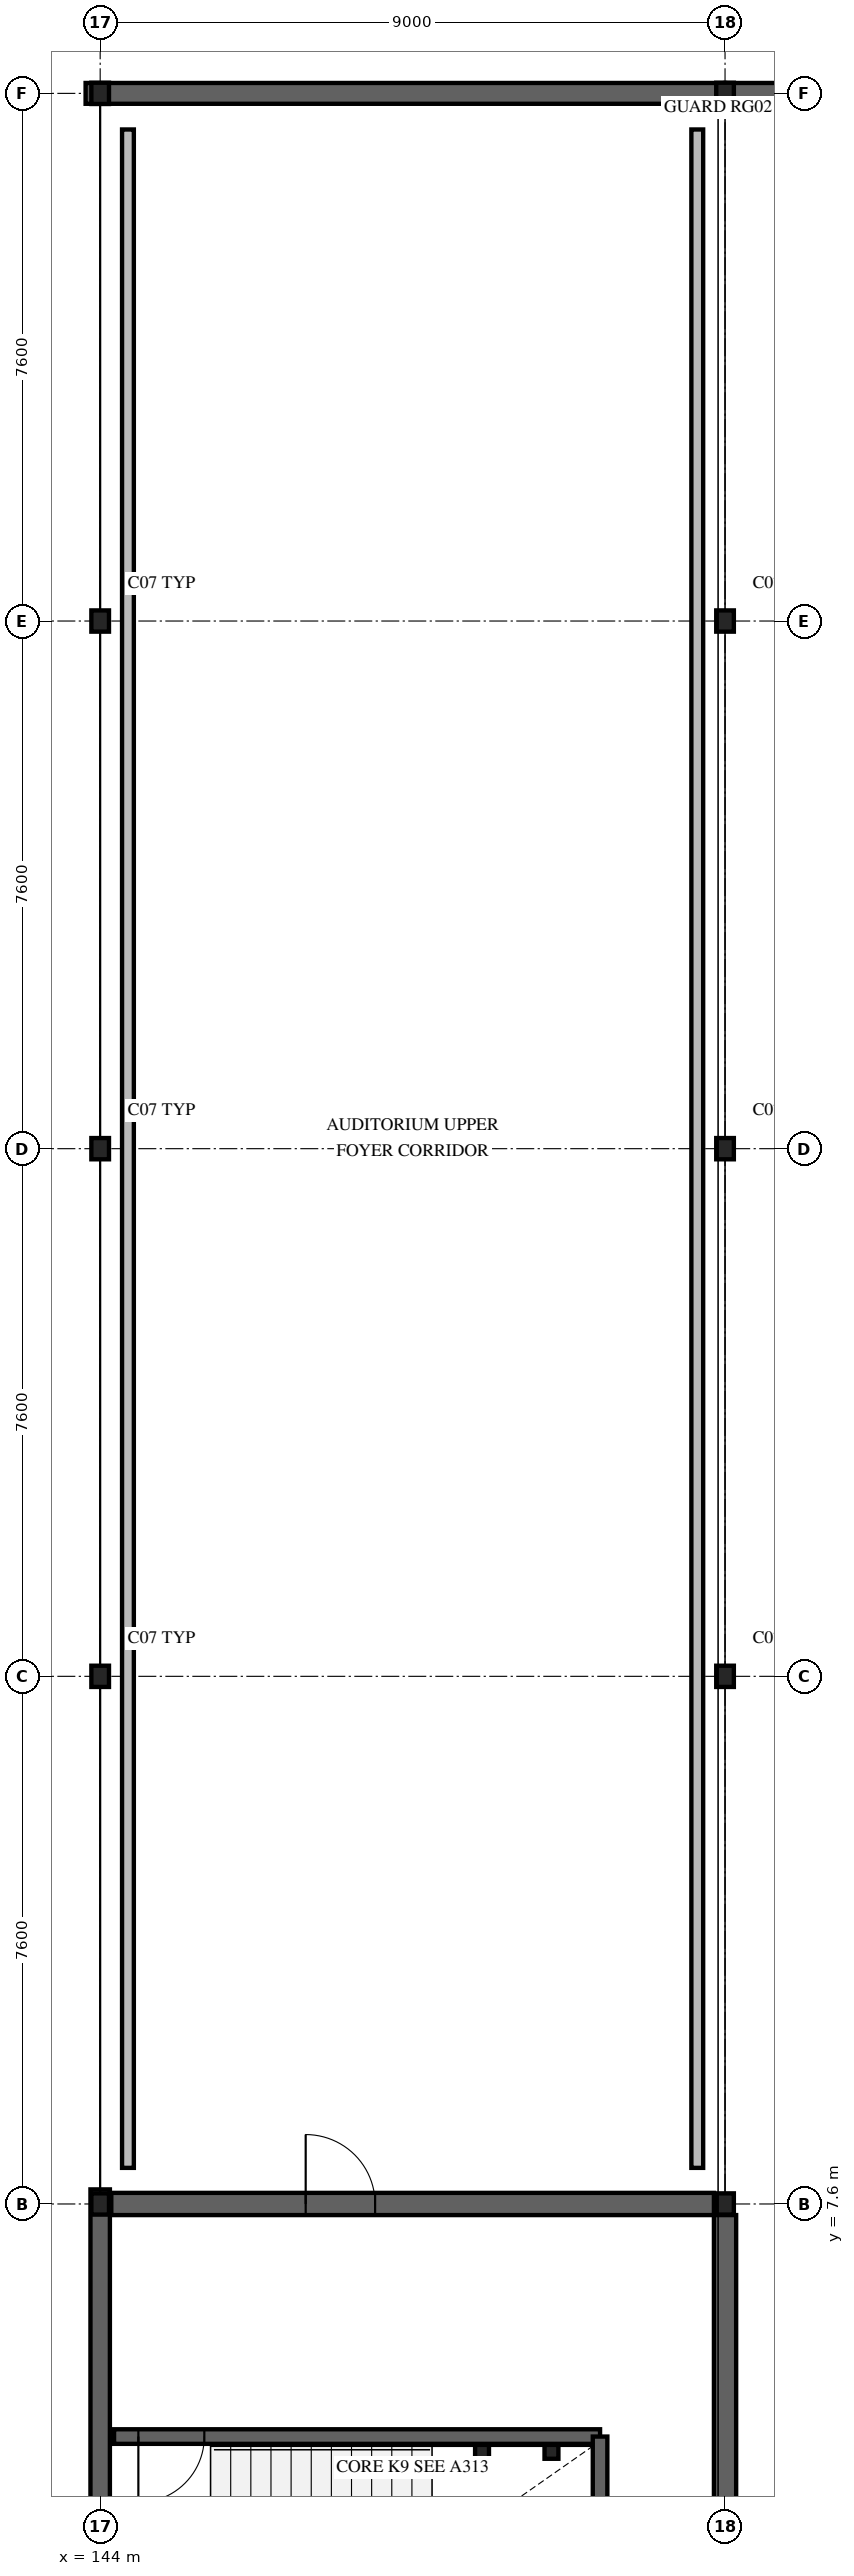
"""IFC4 building model, lengths in metres.
Left out: names, types, materials, properties, quantities, classifications, styles, units other than length and angle.
Written with IfcOpenShell. Run it as: python <this file> out.ifc"""

import sys

from ifc_helpers import new_model, si_unit, direction, frame, frame_2d, origin, origin_2d, place, context, subcontext, project, spatial, rectangle, hollow_rectangle, i_section, extrude, element, fill, save


model = new_model("IFC4")
c1 = context("Model", 3, precision=1e-05, world=origin(), true_north=direction((0.0, 1.0)))
c2 = subcontext(c1, "Body", "Model", "MODEL_VIEW")
j1 = project(units=[si_unit("LENGTHUNIT", "METRE"), si_unit("PLANEANGLEUNIT", "RADIAN")], contexts=[c1])
p1 = place(None, origin())
s1 = spatial("IfcSite", under=j1, at=p1, CompositionType="ELEMENT")
p2 = place(p1, origin())
s2 = spatial("IfcBuilding", under=s1, at=p2, CompositionType="ELEMENT")
p3 = place(p2, frame((0.0, 0.0, 5.04)))
s3 = spatial("IfcBuildingStorey", under=s2, at=p3, CompositionType="ELEMENT", Elevation=5.04)
for number, where, z_axis, x_axis in (
    (1, (144.0, 7.6, 0.0), (0.0, 0.0, 1.0), (1.0, 0.0, 0.0)),
    (2, (144.0, 15.2, 0.0), (0.0, 0.0, 1.0), (1.0, 0.0, 0.0)),
    (3, (144.0, 22.8, 0.0), (0.0, 0.0, 1.0), (1.0, 0.0, 0.0)),
    (4, (144.0, 30.4, 0.0), (0.0, 0.0, 1.0), (1.0, 0.0, 0.0)),
    (5, (144.0, 38.0, 0.0), (0.0, 0.0, 1.0), (1.0, 0.0, 0.0)),
    (6, (153.0, 7.6, 0.0), (0.0, 0.0, 1.0), (1.0, 0.0, 0.0)),
    (7, (153.0, 15.2, 0.0), (0.0, 0.0, 1.0), (1.0, 0.0, 0.0)),
    (8, (153.0, 22.8, 0.0), (0.0, 0.0, 1.0), (1.0, 0.0, 0.0)),
    (9, (153.0, 30.4, 0.0), (0.0, 0.0, 1.0), (1.0, 0.0, 0.0)),
    (10, (153.0, 38.0, 0.0), (0.0, 0.0, 1.0), (1.0, 0.0, 0.0)),
):
    element("IfcColumn", number, at=place(p3, frame(where, z_axis=z_axis, x_axis=x_axis)), inside=s3, PredefinedType="COLUMN", context=c2, shape_type="SweptSolid", body=[
        extrude(i_section(OverallWidth=0.254, OverallDepth=0.306, WebThickness=0.009, FlangeThickness=0.015, FilletRadius=0.015, at=origin_2d()), origin(), (0.0, 0.0, 1.0), 4.32),
    ])
p4 = place(p3, frame((144.0, 0.0, 0.0), z_axis=(0.0, 0.0, 1.0), x_axis=(0.0, 1.0, 0.0)))
e11 = element("IfcWall", 11, at=p4, inside=s3, PredefinedType="SOLIDWALL", context=c2, shape_type="SweptSolid", body=[
    extrude(rectangle(XDim=7.81, YDim=0.28, at=frame_2d((3.905, 0.0))), origin(), (0.0, 0.0, 1.0), 4.32),
])
p5 = place(p3, frame((143.79, 38.0, 0.0), z_axis=(0.0, 0.0, 1.0), x_axis=(1.0, 0.0, 0.0)))
e12 = element("IfcWall", 12, at=p5, inside=s3, PredefinedType="SOLIDWALL", context=c2, shape_type="SweptSolid", body=[
    extrude(rectangle(XDim=9.21, YDim=0.3, at=frame_2d((4.605, 0.0))), origin(), (0.0, 0.0, 1.0), 4.32),
])
p6 = place(p3, frame((153.0, 38.0, 0.0), z_axis=(0.0, 0.0, 1.0), x_axis=(1.0, 0.0, 0.0)))
e13 = element("IfcWall", 13, at=p6, inside=s3, PredefinedType="SOLIDWALL", context=c2, shape_type="SweptSolid", body=[
    extrude(rectangle(XDim=9.0, YDim=0.3, at=frame_2d((4.5, 0.0))), origin(), (0.0, 0.0, 1.0), 4.32),
])
p7 = place(p3, frame((144.16, 7.6, 0.0), z_axis=(0.0, 0.0, 1.0), x_axis=(1.0, 0.0, 0.0)))
e14 = element("IfcWall", 14, at=p7, inside=s3, PredefinedType="SHEAR", context=c2, shape_type="SweptSolid", body=[
    extrude(rectangle(XDim=8.68, YDim=0.32, at=frame_2d((4.34, 0.0))), origin(), (0.0, 0.0, 1.0), 4.04),
])
p8 = place(p7, frame((2.8, 0.0, 0.0)))
e15 = element("IfcOpeningElement", 15, at=p8, cuts=e14, PredefinedType="OPENING", context=c2, shape_type="SweptSolid", body=[
    extrude(rectangle(XDim=1.0, YDim=2.15, at=frame_2d((0.5, 1.075))), frame((0.0, 0.17, 0.0), z_axis=(0.0, -1.0, 0.0), x_axis=(1.0, 0.0, 0.0)), (0.0, 0.0, 1.0), 0.34),
])
p9 = place(p3, frame((153.0, 0.16, 0.0), z_axis=(0.0, 0.0, 1.0), x_axis=(0.0, 1.0, 0.0)))
e16 = element("IfcWall", 16, at=p9, inside=s3, PredefinedType="SHEAR", context=c2, shape_type="SweptSolid", body=[
    extrude(rectangle(XDim=7.28, YDim=0.32, at=frame_2d((3.64, 0.0))), origin(), (0.0, 0.0, 1.0), 4.04),
])
p10 = place(p3, frame((144.2, 4.25, 0.0), z_axis=(0.0, 0.0, 1.0), x_axis=(1.0, 0.0, 0.0)))
e17 = element("IfcWall", 17, at=p10, inside=s3, PredefinedType="SOLIDWALL", context=c2, shape_type="SweptSolid", body=[
    extrude(rectangle(XDim=7.0, YDim=0.21, at=frame_2d((3.5, 0.0))), origin(), (0.0, 0.0, 1.0), 4.04),
])
p11 = place(p10, frame((0.35, 0.0, 0.0)))
e18 = element("IfcOpeningElement", 18, at=p11, cuts=e17, PredefinedType="OPENING", context=c2, shape_type="SweptSolid", body=[
    extrude(rectangle(XDim=0.95, YDim=2.12, at=frame_2d((0.475, 1.06))), frame((0.0, 0.115, 0.0), z_axis=(0.0, -1.0, 0.0), x_axis=(1.0, 0.0, 0.0)), (0.0, 0.0, 1.0), 0.23),
])
p12 = place(p3, frame((151.2, 0.2, 0.0), z_axis=(0.0, 0.0, 1.0), x_axis=(0.0, 1.0, 0.0)))
e19 = element("IfcWall", 19, at=p12, inside=s3, PredefinedType="SOLIDWALL", context=c2, shape_type="SweptSolid", body=[
    extrude(rectangle(XDim=4.05, YDim=0.21, at=frame_2d((2.025, 0.0))), origin(), (0.0, 0.0, 1.0), 4.04),
])
for number, where, z_axis, x_axis in (
    (20, (149.5, 4.03, 0.0), (0.0, 0.0, 1.0), (1.0, 0.0, 0.0)),
    (21, (150.5, 4.03, 0.0), (0.0, 0.0, 1.0), (1.0, 0.0, 0.0)),
):
    element("IfcColumn", number, at=place(p3, frame(where, z_axis=z_axis, x_axis=x_axis)), inside=s3, PredefinedType="COLUMN", context=c2, shape_type="SweptSolid", body=[
        extrude(hollow_rectangle(XDim=0.2, YDim=0.2, WallThickness=0.012, at=origin_2d()), origin(), (0.0, 0.0, 1.0), 1.97),
    ])
for number, where, z_axis, x_axis in (
    (22, (144.4, 8.12, 0.0), (0.0, 0.0, 1.0), (0.0, 1.0, 0.0)),
    (23, (152.6, 8.12, 0.0), (0.0, 0.0, 1.0), (0.0, 1.0, 0.0)),
):
    element("IfcWall", number, at=place(p3, frame(where, z_axis=z_axis, x_axis=x_axis)), inside=s3, PredefinedType="PARTITIONING", context=c2, shape_type="SweptSolid", body=[
        extrude(rectangle(XDim=29.36, YDim=0.17, at=frame_2d((14.68, 0.0))), origin(), (0.0, 0.0, 1.0), 4.04),
    ])
p13 = place(p11, origin())
e24 = element("IfcDoor", 24, at=p13, inside=s3, OperationType="SINGLE_SWING_RIGHT", PredefinedType="DOOR", context=c2, shape_type="SweptSolid", body=[
    extrude(rectangle(XDim=0.95, YDim=2.12, at=frame_2d((0.475, 1.06))), frame((0.0, 0.025, 0.0), z_axis=(0.0, -1.0, 0.0), x_axis=(1.0, 0.0, 0.0)), (0.0, 0.0, 1.0), 0.05),
])
fill(e18, e24)
p14 = place(p8, origin())
e25 = element("IfcDoor", 25, at=p14, inside=s3, OperationType="SINGLE_SWING_LEFT", PredefinedType="DOOR", context=c2, shape_type="SweptSolid", body=[
    extrude(rectangle(XDim=1.0, YDim=2.15, at=frame_2d((0.5, 1.075))), frame((0.0, 0.025, 0.0), z_axis=(0.0, -1.0, 0.0), x_axis=(1.0, 0.0, 0.0)), (0.0, 0.0, 1.0), 0.05),
])
fill(e15, e25)
save(model, sys.argv[1])
